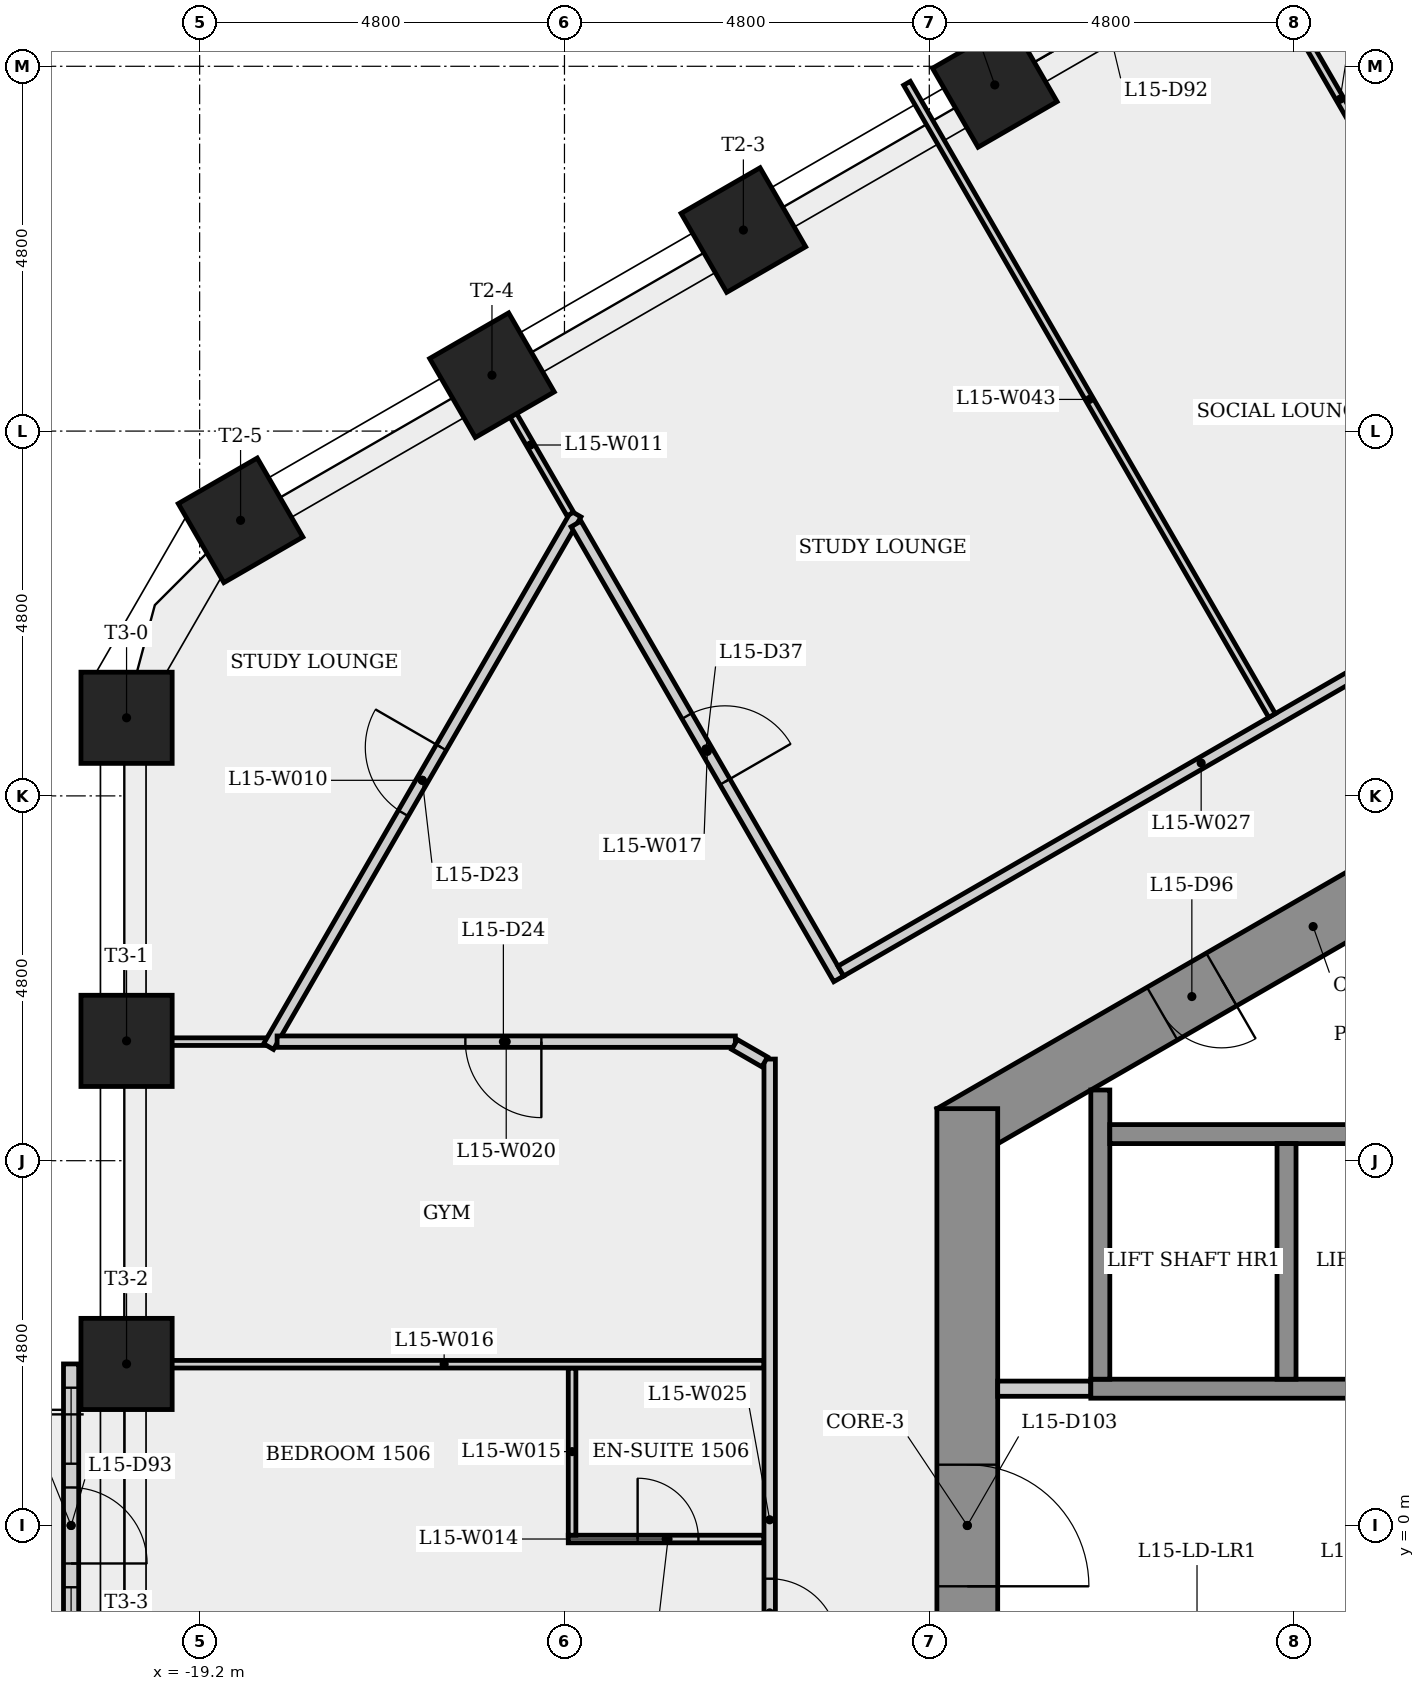
"""IFC4 building model, lengths in metres.
Left out: names, types, materials, properties, quantities, classifications, styles, units other than length and angle.
Written with IfcOpenShell. Run it as: python <this file> out.ifc"""

import sys

from ifc_helpers import new_model, si_unit, direction, frame, frame_2d, origin, origin_2d, place, context, subcontext, project, spatial, rectangle, extrude, element, fill, save


model = new_model("IFC4")
c1 = context("Model", 3, precision=1e-05, world=origin(), true_north=direction((0.0, 1.0)))
c2 = subcontext(c1, "Body", "Model", "MODEL_VIEW")
j1 = project(units=[si_unit("LENGTHUNIT", "METRE"), si_unit("PLANEANGLEUNIT", "RADIAN")], contexts=[c1])
p1 = place(None, origin())
s1 = spatial("IfcSite", under=j1, at=p1, CompositionType="ELEMENT")
p2 = place(p1, origin())
s2 = spatial("IfcBuilding", under=s1, at=p2, CompositionType="ELEMENT")
p3 = place(p2, frame((0.0, 0.0, 59.5)))
s3 = spatial("IfcBuildingStorey", under=s2, at=p3, CompositionType="ELEMENT", Elevation=59.5)
p4 = place(p3, frame((0.2, 10.623, 0.0), z_axis=(0.0, 0.0, 1.0), x_axis=(-0.866023993627, -0.500002442456, 0.0)))
e1 = element("IfcWall", 1, at=p4, inside=s3, PredefinedType="SHEAR", context=c2, shape_type="SweptSolid", body=[
    extrude(rectangle(XDim=10.97, YDim=0.8, at=frame_2d((5.485, 0.0))), origin(), (0.0, 0.0, 1.0), 3.4),
])
p5 = place(p4, frame((6.877, 0.0, 0.0)))
e2 = element("IfcOpeningElement", 2, at=p5, cuts=e1, PredefinedType="OPENING", context=c2, shape_type="SweptSolid", body=[
    extrude(rectangle(XDim=0.9, YDim=2.1, at=frame_2d((0.45, 1.05))), frame((0.0, 0.41, 0.0), z_axis=(0.0, -1.0, 0.0), x_axis=(1.0, 0.0, 0.0)), (0.0, 0.0, 1.0), 0.82),
])
p6 = place(p3, frame((-9.1, 5.485, 0.0), z_axis=(0.0, 0.0, 1.0), x_axis=(0.0, -1.0, 0.0)))
e3 = element("IfcWall", 3, at=p6, inside=s3, PredefinedType="SHEAR", context=c2, shape_type="SweptSolid", body=[
    extrude(rectangle(XDim=10.97, YDim=0.8, at=frame_2d((5.485, 0.0))), origin(), (0.0, 0.0, 1.0), 3.4),
])
p7 = place(p6, frame((4.685, 0.0, 0.0)))
e4 = element("IfcOpeningElement", 4, at=p7, cuts=e3, PredefinedType="OPENING", context=c2, shape_type="SweptSolid", body=[
    extrude(rectangle(XDim=1.6, YDim=2.1, at=frame_2d((0.8, 1.05))), frame((0.0, 0.41, 0.0), z_axis=(0.0, -1.0, 0.0), x_axis=(1.0, 0.0, 0.0)), (0.0, 0.0, 1.0), 0.82),
])
for number, where, z_axis, x_axis in (
    (5, (-8.739, 18.955, 0.0), (0.0, 0.0, 1.0), (-0.5, 0.866, 0.0)),
    (6, (-12.046, 17.045, 0.0), (0.0, 0.0, 1.0), (-0.5, 0.866, 0.0)),
    (7, (-15.354, 15.135, 0.0), (0.0, 0.0, 1.0), (-0.5, 0.866, 0.0)),
    (8, (-18.661, 13.226, 0.0), (0.0, 0.0, 1.0), (-0.5, 0.866, 0.0)),
    (9, (-20.161, 10.628, 0.0), (0.0, 0.0, 1.0), (-1.0, 0.0, 0.0)),
    (10, (-20.161, 6.377, 0.0), (0.0, 0.0, 1.0), (-1.0, 0.0, 0.0)),
    (11, (-20.161, 2.125, 0.0), (0.0, 0.0, 1.0), (-1.0, 0.0, 0.0)),
):
    element("IfcColumn", number, at=place(p3, frame(where, z_axis=z_axis, x_axis=x_axis)), inside=s3, PredefinedType="COLUMN", context=c2, shape_type="SweptSolid", body=[
        extrude(rectangle(XDim=1.2, YDim=1.2, at=origin_2d()), origin(), (0.0, 0.0, 1.0), 3.4),
    ])
p8 = place(p3, frame((-20.891, 2.126, 0.0), z_axis=(0.0, 0.0, 1.0), x_axis=(0.0, -1.0, 0.0)))
e12 = element("IfcWall", 12, at=p8, inside=s3, PredefinedType="SOLIDWALL", context=c2, shape_type="SweptSolid", body=[
    extrude(rectangle(XDim=4.251, YDim=0.2, at=frame_2d((2.125, 0.0))), origin(), (0.0, 0.0, 1.0), 3.4),
])
p9 = place(p8, frame((1.625, 0.0, 0.0)))
e13 = element("IfcOpeningElement", 13, at=p9, cuts=e12, PredefinedType="OPENING", context=c2, shape_type="SweptSolid", body=[
    extrude(rectangle(XDim=1.0, YDim=2.4, at=frame_2d((0.5, 1.2))), frame((0.0, 0.11, 0.0), z_axis=(0.0, -1.0, 0.0), x_axis=(1.0, 0.0, 0.0)), (0.0, 0.0, 1.0), 0.22),
])
p10 = place(p8, frame((0.313, 0.0, 0.9)))
e14 = element("IfcOpeningElement", 14, at=p10, cuts=e12, PredefinedType="OPENING", context=c2, shape_type="SweptSolid", body=[
    extrude(rectangle(XDim=1.0, YDim=1.5, at=frame_2d((0.5, 0.75))), frame((0.0, 0.11, 0.0), z_axis=(0.0, -1.0, 0.0), x_axis=(1.0, 0.0, 0.0)), (0.0, 0.0, 1.0), 0.22),
])
p11 = place(p8, frame((2.938, 0.0, 0.9)))
e15 = element("IfcOpeningElement", 15, at=p11, cuts=e12, PredefinedType="OPENING", context=c2, shape_type="SweptSolid", body=[
    extrude(rectangle(XDim=1.0, YDim=1.5, at=frame_2d((0.5, 0.75))), frame((0.0, 0.11, 0.0), z_axis=(0.0, -1.0, 0.0), x_axis=(1.0, 0.0, 0.0)), (0.0, 0.0, 1.0), 0.22),
])
p12 = place(p3, frame((-18.331, 6.366, 0.0), z_axis=(0.0, 0.0, 1.0), x_axis=(-1.0, 0.0, 0.0)))
e16 = element("IfcWall", 16, at=p12, inside=s3, PredefinedType="PARTITIONING", context=c2, shape_type="SweptSolid", body=[
    extrude(rectangle(XDim=1.86, YDim=0.1, at=frame_2d((0.93, 0.0))), origin(), (0.0, 0.0, 1.0), 3.05),
])
p13 = place(p3, frame((-18.293, 6.302, 0.0), z_axis=(0.0, 0.0, 1.0), x_axis=(0.500010634519, 0.866019263855, 0.0)))
e17 = element("IfcWall", 17, at=p13, inside=s3, PredefinedType="PARTITIONING", context=c2, shape_type="SweptSolid", body=[
    extrude(rectangle(XDim=8.091, YDim=0.15, at=frame_2d((4.045, 0.0))), origin(), (0.0, 0.0, 1.0), 3.05),
])
p14 = place(p13, frame((3.546, 0.0, 0.0)))
e18 = element("IfcOpeningElement", 18, at=p14, cuts=e17, PredefinedType="OPENING", context=c2, shape_type="SweptSolid", body=[
    extrude(rectangle(XDim=1.0, YDim=2.1, at=frame_2d((0.5, 1.05))), frame((0.0, 0.085, 0.0), z_axis=(0.0, -1.0, 0.0), x_axis=(1.0, 0.0, 0.0)), (0.0, 0.0, 1.0), 0.17),
])
p15 = place(p3, frame((-15.372, 15.125, 0.0), z_axis=(0.0, 0.0, 1.0), x_axis=(0.499994469932, -0.866028596547, 0.0)))
e19 = element("IfcWall", 19, at=p15, inside=s3, PredefinedType="PARTITIONING", context=c2, shape_type="SweptSolid", body=[
    extrude(rectangle(XDim=2.098, YDim=0.1, at=frame_2d((1.049, 0.0))), origin(), (0.0, 0.0, 1.0), 3.05),
])
p16 = place(p3, frame((-14.35, -0.178, 0.0), z_axis=(0.0, 0.0, 1.0), x_axis=(1.0, 0.0, 0.0)))
e20 = element("IfcWall", 20, at=p16, inside=s3, PredefinedType="PARTITIONING", context=c2, shape_type="SweptSolid", body=[
    extrude(rectangle(XDim=2.575, YDim=0.1, at=frame_2d((1.288, 0.0))), origin(), (0.0, 0.0, 1.0), 3.05),
])
p17 = place(p16, frame((0.913, 0.0, 0.0)))
e21 = element("IfcOpeningElement", 21, at=p17, cuts=e20, PredefinedType="OPENING", context=c2, shape_type="SweptSolid", body=[
    extrude(rectangle(XDim=0.8, YDim=2.1, at=frame_2d((0.4, 1.05))), frame((0.0, 0.06, 0.0), z_axis=(0.0, -1.0, 0.0), x_axis=(1.0, 0.0, 0.0)), (0.0, 0.0, 1.0), 0.12),
])
p18 = place(p3, frame((-14.3, 2.072, 0.0), z_axis=(0.0, 0.0, 1.0), x_axis=(0.0, -1.0, 0.0)))
e22 = element("IfcWall", 22, at=p18, inside=s3, PredefinedType="PARTITIONING", context=c2, shape_type="SweptSolid", body=[
    extrude(rectangle(XDim=2.2, YDim=0.1, at=frame_2d((1.1, 0.0))), origin(), (0.0, 0.0, 1.0), 3.05),
])
p19 = place(p3, frame((-20.191, 2.122, 0.0), z_axis=(0.0, 0.0, 1.0), x_axis=(1.0, 0.0, 0.0)))
e23 = element("IfcWall", 23, at=p19, inside=s3, PredefinedType="PARTITIONING", context=c2, shape_type="SweptSolid", body=[
    extrude(rectangle(XDim=8.416, YDim=0.1, at=frame_2d((4.208, 0.0))), origin(), (0.0, 0.0, 1.0), 3.05),
])
p20 = place(p3, frame((-14.248, 13.179, 0.0), z_axis=(0.0, 0.0, 1.0), x_axis=(0.499998642356, -0.866026187619, 0.0)))
e24 = element("IfcWall", 24, at=p20, inside=s3, PredefinedType="PARTITIONING", context=c2, shape_type="SweptSolid", body=[
    extrude(rectangle(XDim=6.912, YDim=0.15, at=frame_2d((3.456, 0.0))), origin(), (0.0, 0.0, 1.0), 3.05),
])
p21 = place(p20, frame((2.918, 0.0, 0.0)))
e25 = element("IfcOpeningElement", 25, at=p21, cuts=e24, PredefinedType="OPENING", context=c2, shape_type="SweptSolid", body=[
    extrude(rectangle(XDim=1.0, YDim=2.1, at=frame_2d((0.5, 1.05))), frame((0.0, 0.085, 0.0), z_axis=(0.0, -1.0, 0.0), x_axis=(1.0, 0.0, 0.0)), (0.0, 0.0, 1.0), 0.17),
])
p22 = place(p3, frame((-12.152, 6.366, 0.0), z_axis=(0.0, 0.0, 1.0), x_axis=(-1.0, 0.0, 0.0)))
e26 = element("IfcWall", 26, at=p22, inside=s3, PredefinedType="PARTITIONING", context=c2, shape_type="SweptSolid", body=[
    extrude(rectangle(XDim=6.029, YDim=0.15, at=frame_2d((3.015, 0.0))), origin(), (0.0, 0.0, 1.0), 3.05),
])
p23 = place(p22, frame((2.552, 0.0, 0.0)))
e27 = element("IfcOpeningElement", 27, at=p23, cuts=e26, PredefinedType="OPENING", context=c2, shape_type="SweptSolid", body=[
    extrude(rectangle(XDim=1.0, YDim=2.1, at=frame_2d((0.5, 1.05))), frame((0.0, 0.085, 0.0), z_axis=(0.0, -1.0, 0.0), x_axis=(1.0, 0.0, 0.0)), (0.0, 0.0, 1.0), 0.17),
])
p24 = place(p3, frame((-11.7, 6.137, 0.0), z_axis=(0.0, 0.0, 1.0), x_axis=(0.0, -1.0, 0.0)))
e28 = element("IfcWall", 28, at=p24, inside=s3, PredefinedType="PARTITIONING", context=c2, shape_type="SweptSolid", body=[
    extrude(rectangle(XDim=12.125, YDim=0.15, at=frame_2d((6.062, 0.0))), origin(), (0.0, 0.0, 1.0), 3.05),
])
p25 = place(p24, frame((6.837, 0.0, 0.0)))
e29 = element("IfcOpeningElement", 29, at=p25, cuts=e28, PredefinedType="OPENING", context=c2, shape_type="SweptSolid", body=[
    extrude(rectangle(XDim=0.9, YDim=2.1, at=frame_2d((0.45, 1.05))), frame((0.0, 0.085, 0.0), z_axis=(0.0, -1.0, 0.0), x_axis=(1.0, 0.0, 0.0)), (0.0, 0.0, 1.0), 0.17),
])
p26 = place(p3, frame((-11.765, 6.1, 0.0), z_axis=(0.0, 0.0, 1.0), x_axis=(-0.865972712538, 0.500091252813, 0.0)))
e30 = element("IfcWall", 30, at=p26, inside=s3, PredefinedType="PARTITIONING", context=c2, shape_type="SweptSolid", body=[
    extrude(rectangle(XDim=0.458, YDim=0.15, at=frame_2d((0.229, 0.0))), origin(), (0.0, 0.0, 1.0), 3.05),
])
p27 = place(p3, frame((-10.764, 7.295, 0.0), z_axis=(0.0, 0.0, 1.0), x_axis=(0.866028150195, 0.499995243048, 0.0)))
e31 = element("IfcWall", 31, at=p27, inside=s3, PredefinedType="PARTITIONING", context=c2, shape_type="SweptSolid", body=[
    extrude(rectangle(XDim=10.949, YDim=0.15, at=frame_2d((5.475, 0.0))), origin(), (0.0, 0.0, 1.0), 3.05),
])
p28 = place(p3, frame((-8.7, 1.8, 0.0), z_axis=(0.0, 0.0, 1.0), x_axis=(1.0, 0.0, 0.0)))
e32 = element("IfcWall", 32, at=p28, inside=s3, PredefinedType="PARTITIONING", context=c2, shape_type="SweptSolid", body=[
    extrude(rectangle(XDim=1.225, YDim=0.2, at=frame_2d((0.613, 0.0))), origin(), (0.0, 0.0, 1.0), 3.05),
])
p29 = place(p3, frame((-7.475, 1.8, 0.0), z_axis=(0.0, 0.0, 1.0), x_axis=(1.0, 0.0, 0.0)))
e33 = element("IfcWall", 33, at=p29, inside=s3, PredefinedType="SHEAR", context=c2, shape_type="SweptSolid", body=[
    extrude(rectangle(XDim=14.95, YDim=0.25, at=frame_2d((7.475, 0.0))), origin(), (0.0, 0.0, 1.0), 3.05),
])
p30 = place(p3, frame((-7.35, 1.925, 0.0), z_axis=(0.0, 0.0, 1.0), x_axis=(0.0, 1.0, 0.0)))
e34 = element("IfcWall", 34, at=p30, inside=s3, PredefinedType="SHEAR", context=c2, shape_type="SweptSolid", body=[
    extrude(rectangle(XDim=3.805, YDim=0.25, at=frame_2d((1.903, 0.0))), origin(), (0.0, 0.0, 1.0), 3.05),
])
p31 = place(p3, frame((-7.225, 5.15, 0.0), z_axis=(0.0, 0.0, 1.0), x_axis=(1.0, 0.0, 0.0)))
e35 = element("IfcWall", 35, at=p31, inside=s3, PredefinedType="SHEAR", context=c2, shape_type="SweptSolid", body=[
    extrude(rectangle(XDim=14.7, YDim=0.25, at=frame_2d((7.35, 0.0))), origin(), (0.0, 0.0, 1.0), 3.05),
])
p32 = place(p3, frame((-5.091, 10.657, 0.0), z_axis=(0.0, 0.0, 1.0), x_axis=(-0.499998937792, 0.866026017049, 0.0)))
e36 = element("IfcWall", 36, at=p32, inside=s3, PredefinedType="PARTITIONING", context=c2, shape_type="SweptSolid", body=[
    extrude(rectangle(XDim=9.605, YDim=0.1, at=frame_2d((4.803, 0.0))), origin(), (0.0, 0.0, 1.0), 3.05),
])
p33 = place(p3, frame((-4.9, 5.025, 0.0), z_axis=(0.0, 0.0, 1.0), x_axis=(0.0, -1.0, 0.0)))
e37 = element("IfcWall", 37, at=p33, inside=s3, PredefinedType="SHEAR", context=c2, shape_type="SweptSolid", body=[
    extrude(rectangle(XDim=3.1, YDim=0.25, at=frame_2d((1.55, 0.0))), origin(), (0.0, 0.0, 1.0), 3.4),
])
p34 = place(p3, frame((-2.979, 16.658, 0.0), z_axis=(0.0, 0.0, 1.0), x_axis=(-0.500021943523, 0.866012734315, 0.0)))
e38 = element("IfcWall", 38, at=p34, inside=s3, PredefinedType="PARTITIONING", context=c2, shape_type="SweptSolid", body=[
    extrude(rectangle(XDim=4.869, YDim=0.1, at=frame_2d((2.435, 0.0))), origin(), (0.0, 0.0, 1.0), 3.05),
])
p35 = place(p9, origin())
e39 = element("IfcDoor", 39, at=p35, inside=s3, OperationType="SINGLE_SWING_RIGHT", PredefinedType="DOOR", context=c2, shape_type="SweptSolid", body=[
    extrude(rectangle(XDim=1.0, YDim=2.4, at=frame_2d((0.5, 1.2))), frame((0.0, 0.025, 0.0), z_axis=(0.0, -1.0, 0.0), x_axis=(1.0, 0.0, 0.0)), (0.0, 0.0, 1.0), 0.05),
])
fill(e13, e39)
p36 = place(p10, origin())
e40 = element("IfcWindow", 40, at=p36, inside=s3, PartitioningType="SINGLE_PANEL", PredefinedType="WINDOW", context=c2, shape_type="SweptSolid", body=[
    extrude(rectangle(XDim=1.0, YDim=1.5, at=frame_2d((0.5, 0.75))), frame((0.0, 0.03, 0.0), z_axis=(0.0, -1.0, 0.0), x_axis=(1.0, 0.0, 0.0)), (0.0, 0.0, 1.0), 0.06),
])
fill(e14, e40)
p37 = place(p11, origin())
e41 = element("IfcWindow", 41, at=p37, inside=s3, PartitioningType="SINGLE_PANEL", PredefinedType="WINDOW", context=c2, shape_type="SweptSolid", body=[
    extrude(rectangle(XDim=1.0, YDim=1.5, at=frame_2d((0.5, 0.75))), frame((0.0, 0.03, 0.0), z_axis=(0.0, -1.0, 0.0), x_axis=(1.0, 0.0, 0.0)), (0.0, 0.0, 1.0), 0.06),
])
fill(e15, e41)
p38 = place(p14, origin())
e42 = element("IfcDoor", 42, at=p38, inside=s3, OperationType="SINGLE_SWING_RIGHT", PredefinedType="DOOR", context=c2, shape_type="SweptSolid", body=[
    extrude(rectangle(XDim=1.0, YDim=2.1, at=frame_2d((0.5, 1.05))), frame((0.0, 0.025, 0.0), z_axis=(0.0, -1.0, 0.0), x_axis=(1.0, 0.0, 0.0)), (0.0, 0.0, 1.0), 0.05),
])
fill(e18, e42)
p39 = place(p23, origin())
e43 = element("IfcDoor", 43, at=p39, inside=s3, OperationType="SINGLE_SWING_LEFT", PredefinedType="DOOR", context=c2, shape_type="SweptSolid", body=[
    extrude(rectangle(XDim=1.0, YDim=2.1, at=frame_2d((0.5, 1.05))), frame((0.0, 0.025, 0.0), z_axis=(0.0, -1.0, 0.0), x_axis=(1.0, 0.0, 0.0)), (0.0, 0.0, 1.0), 0.05),
])
fill(e27, e43)
p40 = place(p25, origin())
e44 = element("IfcDoor", 44, at=p40, inside=s3, OperationType="SINGLE_SWING_RIGHT", PredefinedType="DOOR", context=c2, shape_type="SweptSolid", body=[
    extrude(rectangle(XDim=0.9, YDim=2.1, at=frame_2d((0.45, 1.05))), frame((0.0, 0.025, 0.0), z_axis=(0.0, -1.0, 0.0), x_axis=(1.0, 0.0, 0.0)), (0.0, 0.0, 1.0), 0.05),
])
fill(e29, e44)
p41 = place(p17, origin())
e45 = element("IfcDoor", 45, at=p41, inside=s3, OperationType="SINGLE_SWING_LEFT", PredefinedType="DOOR", context=c2, shape_type="SweptSolid", body=[
    extrude(rectangle(XDim=0.8, YDim=2.1, at=frame_2d((0.4, 1.05))), frame((0.0, 0.025, 0.0), z_axis=(0.0, -1.0, 0.0), x_axis=(1.0, 0.0, 0.0)), (0.0, 0.0, 1.0), 0.05),
])
fill(e21, e45)
p42 = place(p21, origin())
e46 = element("IfcDoor", 46, at=p42, inside=s3, OperationType="SINGLE_SWING_RIGHT", PredefinedType="DOOR", context=c2, shape_type="SweptSolid", body=[
    extrude(rectangle(XDim=1.0, YDim=2.1, at=frame_2d((0.5, 1.05))), frame((0.0, 0.025, 0.0), z_axis=(0.0, -1.0, 0.0), x_axis=(1.0, 0.0, 0.0)), (0.0, 0.0, 1.0), 0.05),
])
fill(e25, e46)
p43 = place(p5, origin())
e47 = element("IfcDoor", 47, at=p43, inside=s3, OperationType="SINGLE_SWING_LEFT", PredefinedType="DOOR", context=c2, shape_type="SweptSolid", body=[
    extrude(rectangle(XDim=0.9, YDim=2.1, at=frame_2d((0.45, 1.05))), frame((0.0, 0.025, 0.0), z_axis=(0.0, -1.0, 0.0), x_axis=(1.0, 0.0, 0.0)), (0.0, 0.0, 1.0), 0.05),
])
fill(e2, e47)
p44 = place(p7, origin())
e48 = element("IfcDoor", 48, at=p44, inside=s3, OperationType="SINGLE_SWING_RIGHT", PredefinedType="DOOR", context=c2, shape_type="SweptSolid", body=[
    extrude(rectangle(XDim=1.6, YDim=2.1, at=frame_2d((0.8, 1.05))), frame((0.0, 0.025, 0.0), z_axis=(0.0, -1.0, 0.0), x_axis=(1.0, 0.0, 0.0)), (0.0, 0.0, 1.0), 0.05),
])
fill(e4, e48)
save(model, sys.argv[1])
